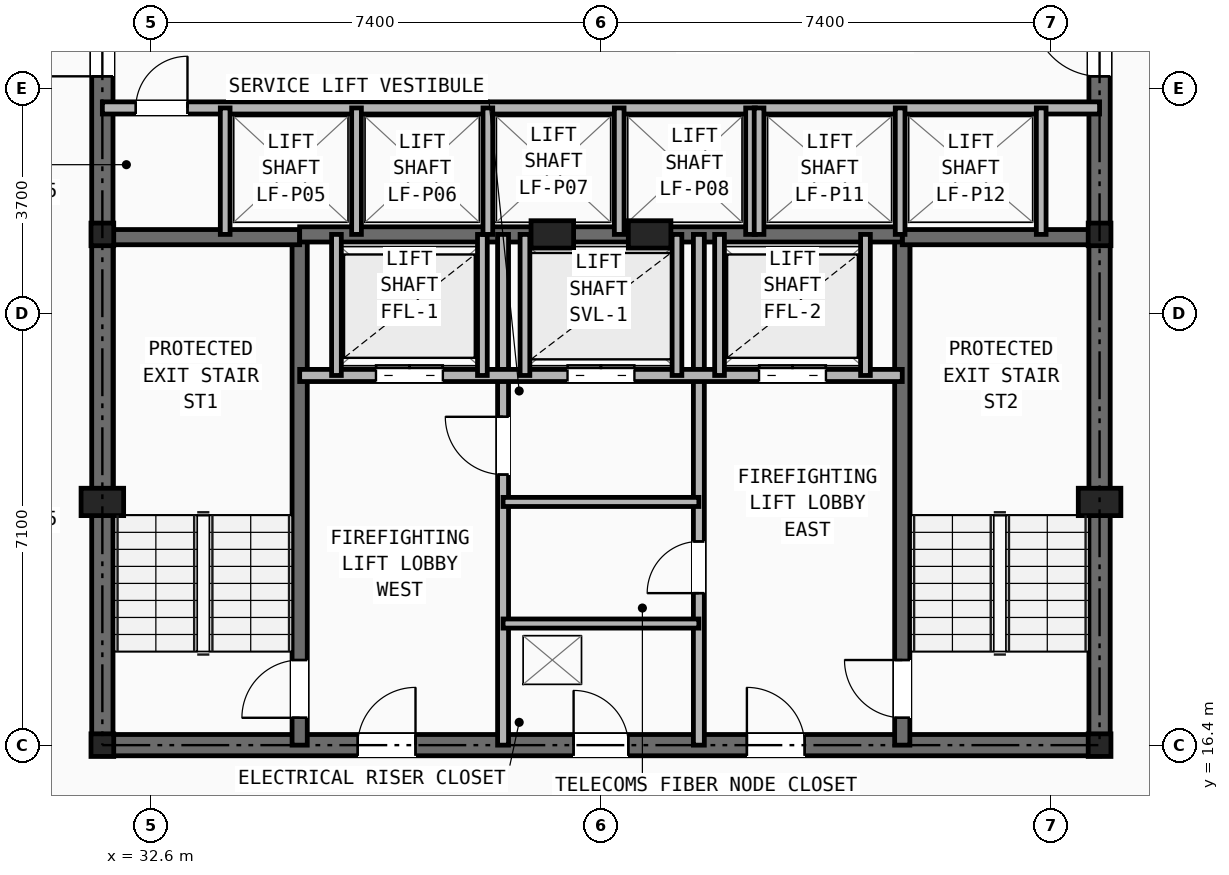
"""IFC4 building model, lengths in metres.
Left out: names, types, materials, properties, quantities, classifications, styles, units other than length and angle.
Written with IfcOpenShell. Run it as: python <this file> out.ifc"""

import sys

from ifc_helpers import new_model, si_unit, direction, frame, frame_2d, origin, origin_2d, place, context, subcontext, project, spatial, rectangle, i_section, extrude, element, fill, save


model = new_model("IFC4")
c1 = context("Model", 3, precision=1e-05, world=origin(), true_north=direction((0.0, 1.0)))
c2 = subcontext(c1, "Body", "Model", "MODEL_VIEW")
j1 = project(units=[si_unit("LENGTHUNIT", "METRE"), si_unit("PLANEANGLEUNIT", "RADIAN")], contexts=[c1])
p1 = place(None, origin())
s1 = spatial("IfcSite", under=j1, at=p1, CompositionType="ELEMENT")
p2 = place(p1, origin())
s2 = spatial("IfcBuilding", under=s1, at=p2, CompositionType="ELEMENT")
p3 = place(p2, frame((0.0, 0.0, 83.0)))
s3 = spatial("IfcBuildingStorey", under=s2, at=p3, CompositionType="ELEMENT", Elevation=83.0)
for number, where, z_axis, x_axis in (
    (1, (31.8, 16.4, 0.0), (0.0, 0.0, 1.0), (1.0, 0.0, 0.0)),
    (2, (48.2, 16.4, 0.0), (0.0, 0.0, 1.0), (1.0, 0.0, 0.0)),
    (3, (31.8, 24.8, 0.0), (0.0, 0.0, 1.0), (1.0, 0.0, 0.0)),
    (4, (48.2, 24.8, 0.0), (0.0, 0.0, 1.0), (1.0, 0.0, 0.0)),
):
    element("IfcColumn", number, at=place(p3, frame(where, z_axis=z_axis, x_axis=x_axis)), inside=s3, PredefinedType="COLUMN", context=c2, shape_type="SweptSolid", body=[
        extrude(i_section(OverallWidth=0.374, OverallDepth=0.372, WebThickness=0.016, FlangeThickness=0.026, at=origin_2d()), origin(), (0.0, 0.0, 1.0), 3.2),
    ])
for number, where, z_axis, x_axis in (
    (5, (31.8, 20.4, 0.0), (0.0, 0.0, 1.0), (1.0, 0.0, 0.0)),
    (6, (48.2, 20.4, 0.0), (0.0, 0.0, 1.0), (1.0, 0.0, 0.0)),
    (7, (39.2, 24.8, 0.0), (0.0, 0.0, 1.0), (1.0, 0.0, 0.0)),
    (8, (40.8, 24.8, 0.0), (0.0, 0.0, 1.0), (1.0, 0.0, 0.0)),
):
    element("IfcColumn", number, at=place(p3, frame(where, z_axis=z_axis, x_axis=x_axis)), inside=s3, PredefinedType="PILASTER", context=c2, shape_type="SweptSolid", body=[
        extrude(rectangle(XDim=0.7, YDim=0.45, at=origin_2d()), origin(), (0.0, 0.0, 1.0), 3.2),
    ])
p4 = place(p3, frame((31.8, 16.4, 0.0), z_axis=(0.0, 0.0, 1.0), x_axis=(1.0, 0.0, 0.0)))
e9 = element("IfcWall", 9, at=p4, inside=s3, PredefinedType="SHEAR", context=c2, shape_type="SweptSolid", body=[
    extrude(rectangle(XDim=16.4, YDim=0.35, at=frame_2d((8.2, 0.0))), origin(), (0.0, 0.0, 1.0), 2.97),
])
p5 = place(p4, frame((7.75, 0.0, 0.0)))
e10 = element("IfcOpeningElement", 10, at=p5, cuts=e9, PredefinedType="OPENING", context=c2, shape_type="SweptSolid", body=[
    extrude(rectangle(XDim=0.9, YDim=2.1, at=frame_2d((0.45, 1.05))), frame((0.0, 0.185, 0.0), z_axis=(0.0, -1.0, 0.0), x_axis=(1.0, 0.0, 0.0)), (0.0, 0.0, 1.0), 0.37),
])
p6 = place(p4, frame((4.2, 0.0, 0.0)))
e11 = element("IfcOpeningElement", 11, at=p6, cuts=e9, PredefinedType="OPENING", context=c2, shape_type="SweptSolid", body=[
    extrude(rectangle(XDim=0.95, YDim=2.1, at=frame_2d((0.475, 1.05))), frame((0.0, 0.185, 0.0), z_axis=(0.0, -1.0, 0.0), x_axis=(1.0, 0.0, 0.0)), (0.0, 0.0, 1.0), 0.37),
])
p7 = place(p4, frame((10.6, 0.0, 0.0)))
e12 = element("IfcOpeningElement", 12, at=p7, cuts=e9, PredefinedType="OPENING", context=c2, shape_type="SweptSolid", body=[
    extrude(rectangle(XDim=0.95, YDim=2.1, at=frame_2d((0.475, 1.05))), frame((0.0, 0.185, 0.0), z_axis=(0.0, -1.0, 0.0), x_axis=(1.0, 0.0, 0.0)), (0.0, 0.0, 1.0), 0.37),
])
p8 = place(p3, frame((31.8, 16.4, 0.0), z_axis=(0.0, 0.0, 1.0), x_axis=(0.0, 1.0, 0.0)))
e13 = element("IfcWall", 13, at=p8, inside=s3, PredefinedType="SHEAR", context=c2, shape_type="SweptSolid", body=[
    extrude(rectangle(XDim=14.8, YDim=0.35, at=frame_2d((7.4, 0.0))), origin(), (0.0, 0.0, 1.0), 2.97),
])
p9 = place(p8, frame((11.0, 0.0, 0.0)))
e14 = element("IfcOpeningElement", 14, at=p9, cuts=e13, PredefinedType="OPENING", context=c2, shape_type="SweptSolid", body=[
    extrude(rectangle(XDim=1.1, YDim=2.15, at=frame_2d((0.55, 1.075))), frame((0.0, 0.185, 0.0), z_axis=(0.0, -1.0, 0.0), x_axis=(1.0, 0.0, 0.0)), (0.0, 0.0, 1.0), 0.37),
])
p10 = place(p3, frame((48.2, 16.4, 0.0), z_axis=(0.0, 0.0, 1.0), x_axis=(0.0, 1.0, 0.0)))
e15 = element("IfcWall", 15, at=p10, inside=s3, PredefinedType="SHEAR", context=c2, shape_type="SweptSolid", body=[
    extrude(rectangle(XDim=14.8, YDim=0.35, at=frame_2d((7.4, 0.0))), origin(), (0.0, 0.0, 1.0), 2.97),
])
p11 = place(p10, frame((11.0, 0.0, 0.0)))
e16 = element("IfcOpeningElement", 16, at=p11, cuts=e15, PredefinedType="OPENING", context=c2, shape_type="SweptSolid", body=[
    extrude(rectangle(XDim=1.1, YDim=2.15, at=frame_2d((0.55, 1.075))), frame((0.0, 0.185, 0.0), z_axis=(0.0, -1.0, 0.0), x_axis=(1.0, 0.0, 0.0)), (0.0, 0.0, 1.0), 0.37),
])
p12 = place(p3, frame((35.045, 16.4, 0.0), z_axis=(0.0, 0.0, 1.0), x_axis=(0.0, 1.0, 0.0)))
e17 = element("IfcWall", 17, at=p12, inside=s3, PredefinedType="SHEAR", context=c2, shape_type="SweptSolid", body=[
    extrude(rectangle(XDim=8.4, YDim=0.25, at=frame_2d((4.2, 0.0))), origin(), (0.0, 0.0, 1.0), 2.97),
])
p13 = place(p12, frame((0.45, 0.0, 0.0)))
e18 = element("IfcOpeningElement", 18, at=p13, cuts=e17, PredefinedType="OPENING", context=c2, shape_type="SweptSolid", body=[
    extrude(rectangle(XDim=0.95, YDim=2.1, at=frame_2d((0.475, 1.05))), frame((0.0, 0.135, 0.0), z_axis=(0.0, -1.0, 0.0), x_axis=(1.0, 0.0, 0.0)), (0.0, 0.0, 1.0), 0.27),
])
p14 = place(p3, frame((31.8, 24.755, 0.0), z_axis=(0.0, 0.0, 1.0), x_axis=(1.0, 0.0, 0.0)))
e19 = element("IfcWall", 19, at=p14, inside=s3, PredefinedType="SHEAR", context=c2, shape_type="SweptSolid", body=[
    extrude(rectangle(XDim=3.245, YDim=0.25, at=frame_2d((1.623, 0.0))), origin(), (0.0, 0.0, 1.0), 2.97),
])
p15 = place(p3, frame((44.955, 16.4, 0.0), z_axis=(0.0, 0.0, 1.0), x_axis=(0.0, 1.0, 0.0)))
e20 = element("IfcWall", 20, at=p15, inside=s3, PredefinedType="SHEAR", context=c2, shape_type="SweptSolid", body=[
    extrude(rectangle(XDim=8.4, YDim=0.25, at=frame_2d((4.2, 0.0))), origin(), (0.0, 0.0, 1.0), 2.97),
])
p16 = place(p15, frame((0.45, 0.0, 0.0)))
e21 = element("IfcOpeningElement", 21, at=p16, cuts=e20, PredefinedType="OPENING", context=c2, shape_type="SweptSolid", body=[
    extrude(rectangle(XDim=0.95, YDim=2.1, at=frame_2d((0.475, 1.05))), frame((0.0, 0.135, 0.0), z_axis=(0.0, -1.0, 0.0), x_axis=(1.0, 0.0, 0.0)), (0.0, 0.0, 1.0), 0.27),
])
p17 = place(p3, frame((44.955, 24.755, 0.0), z_axis=(0.0, 0.0, 1.0), x_axis=(1.0, 0.0, 0.0)))
e22 = element("IfcWall", 22, at=p17, inside=s3, PredefinedType="SHEAR", context=c2, shape_type="SweptSolid", body=[
    extrude(rectangle(XDim=3.245, YDim=0.25, at=frame_2d((1.623, 0.0))), origin(), (0.0, 0.0, 1.0), 2.97),
])
p18 = place(p3, frame((35.045, 24.8, 0.0), z_axis=(0.0, 0.0, 1.0), x_axis=(1.0, 0.0, 0.0)))
e23 = element("IfcWall", 23, at=p18, inside=s3, PredefinedType="SHEAR", context=c2, shape_type="SweptSolid", body=[
    extrude(rectangle(XDim=9.91, YDim=0.25, at=frame_2d((4.955, 0.0))), origin(), (0.0, 0.0, 1.0), 2.97),
])
p19 = place(p3, frame((38.39, 16.4, 0.0), z_axis=(0.0, 0.0, 1.0), x_axis=(0.0, 1.0, 0.0)))
e24 = element("IfcWall", 24, at=p19, inside=s3, PredefinedType="PARTITIONING", context=c2, shape_type="SweptSolid", body=[
    extrude(rectangle(XDim=8.4, YDim=0.18, at=frame_2d((4.2, 0.0))), origin(), (0.0, 0.0, 1.0), 2.421),
])
p20 = place(p19, frame((4.45, 0.0, 0.0)))
e25 = element("IfcOpeningElement", 25, at=p20, cuts=e24, PredefinedType="OPENING", context=c2, shape_type="SweptSolid", body=[
    extrude(rectangle(XDim=0.95, YDim=2.1, at=frame_2d((0.475, 1.05))), frame((0.0, 0.1, 0.0), z_axis=(0.0, -1.0, 0.0), x_axis=(1.0, 0.0, 0.0)), (0.0, 0.0, 1.0), 0.2),
])
p21 = place(p3, frame((41.61, 16.4, 0.0), z_axis=(0.0, 0.0, 1.0), x_axis=(0.0, 1.0, 0.0)))
e26 = element("IfcWall", 26, at=p21, inside=s3, PredefinedType="PARTITIONING", context=c2, shape_type="SweptSolid", body=[
    extrude(rectangle(XDim=8.4, YDim=0.18, at=frame_2d((4.2, 0.0))), origin(), (0.0, 0.0, 1.0), 2.421),
])
p22 = place(p21, frame((2.5, 0.0, 0.0)))
e27 = element("IfcOpeningElement", 27, at=p22, cuts=e26, PredefinedType="OPENING", context=c2, shape_type="SweptSolid", body=[
    extrude(rectangle(XDim=0.85, YDim=2.05, at=frame_2d((0.425, 1.025))), frame((0.0, 0.1, 0.0), z_axis=(0.0, -1.0, 0.0), x_axis=(1.0, 0.0, 0.0)), (0.0, 0.0, 1.0), 0.2),
])
p23 = place(p3, frame((35.045, 22.48, 0.0), z_axis=(0.0, 0.0, 1.0), x_axis=(1.0, 0.0, 0.0)))
e28 = element("IfcWall", 28, at=p23, inside=s3, PredefinedType="SOLIDWALL", context=c2, shape_type="SweptSolid", body=[
    extrude(rectangle(XDim=9.91, YDim=0.2, at=frame_2d((4.955, 0.0))), origin(), (0.0, 0.0, 1.0), 2.97),
])
p24 = place(p23, frame((1.255, 0.0, 0.0)))
e29 = element("IfcOpeningElement", 29, at=p24, cuts=e28, PredefinedType="OPENING", context=c2, shape_type="SweptSolid", body=[
    extrude(rectangle(XDim=1.1, YDim=2.15, at=frame_2d((0.55, 1.075))), frame((0.0, 0.11, 0.0), z_axis=(0.0, -1.0, 0.0), x_axis=(1.0, 0.0, 0.0)), (0.0, 0.0, 1.0), 0.22),
])
p25 = place(p23, frame((7.555, 0.0, 0.0)))
e30 = element("IfcOpeningElement", 30, at=p25, cuts=e28, PredefinedType="OPENING", context=c2, shape_type="SweptSolid", body=[
    extrude(rectangle(XDim=1.1, YDim=2.15, at=frame_2d((0.55, 1.075))), frame((0.0, 0.11, 0.0), z_axis=(0.0, -1.0, 0.0), x_axis=(1.0, 0.0, 0.0)), (0.0, 0.0, 1.0), 0.22),
])
p26 = place(p23, frame((4.405, 0.0, 0.0)))
e31 = element("IfcOpeningElement", 31, at=p26, cuts=e28, PredefinedType="OPENING", context=c2, shape_type="SweptSolid", body=[
    extrude(rectangle(XDim=1.1, YDim=2.15, at=frame_2d((0.55, 1.075))), frame((0.0, 0.11, 0.0), z_axis=(0.0, -1.0, 0.0), x_axis=(1.0, 0.0, 0.0)), (0.0, 0.0, 1.0), 0.22),
])
for number, where, z_axis, x_axis in (
    (32, (38.39, 18.4, 0.0), (0.0, 0.0, 1.0), (1.0, 0.0, 0.0)),
    (33, (38.39, 20.4, 0.0), (0.0, 0.0, 1.0), (1.0, 0.0, 0.0)),
):
    element("IfcWall", number, at=place(p3, frame(where, z_axis=z_axis, x_axis=x_axis)), inside=s3, PredefinedType="PARTITIONING", context=c2, shape_type="SweptSolid", body=[
        extrude(rectangle(XDim=3.22, YDim=0.15, at=frame_2d((1.61, 0.0))), origin(), (0.0, 0.0, 1.0), 2.97),
    ])
for number, where, z_axis, x_axis in (
    (34, (35.65, 22.48, 0.0), (0.0, 0.0, 1.0), (0.0, 1.0, 0.0)),
    (35, (38.05, 22.48, 0.0), (0.0, 0.0, 1.0), (0.0, 1.0, 0.0)),
    (36, (41.95, 22.48, 0.0), (0.0, 0.0, 1.0), (0.0, 1.0, 0.0)),
    (37, (44.35, 22.48, 0.0), (0.0, 0.0, 1.0), (0.0, 1.0, 0.0)),
    (38, (38.75, 22.48, 0.0), (0.0, 0.0, 1.0), (0.0, 1.0, 0.0)),
    (39, (41.25, 22.48, 0.0), (0.0, 0.0, 1.0), (0.0, 1.0, 0.0)),
):
    element("IfcWall", number, at=place(p3, frame(where, z_axis=z_axis, x_axis=x_axis)), inside=s3, PredefinedType="SOLIDWALL", context=c2, shape_type="SweptSolid", body=[
        extrude(rectangle(XDim=2.32, YDim=0.16, at=frame_2d((1.16, 0.0))), origin(), (0.0, 0.0, 1.0), 2.97),
    ])
p27 = place(p3, frame((31.8, 26.88, 0.0), z_axis=(0.0, 0.0, 1.0), x_axis=(1.0, 0.0, 0.0)))
e40 = element("IfcWall", 40, at=p27, inside=s3, PredefinedType="SOLIDWALL", context=c2, shape_type="SweptSolid", body=[
    extrude(rectangle(XDim=16.4, YDim=0.2, at=frame_2d((8.2, 0.0))), origin(), (0.0, 0.0, 1.0), 2.421),
])
p28 = place(p27, frame((0.55, 0.0, 0.0)))
e41 = element("IfcOpeningElement", 41, at=p28, cuts=e40, PredefinedType="OPENING", context=c2, shape_type="SweptSolid", body=[
    extrude(rectangle(XDim=0.85, YDim=2.05, at=frame_2d((0.425, 1.025))), frame((0.0, 0.11, 0.0), z_axis=(0.0, -1.0, 0.0), x_axis=(1.0, 0.0, 0.0)), (0.0, 0.0, 1.0), 0.22),
])
for number, where, z_axis, x_axis in (
    (42, (33.82, 24.8, 0.0), (0.0, 0.0, 1.0), (0.0, 1.0, 0.0)),
    (43, (35.98, 24.8, 0.0), (0.0, 0.0, 1.0), (0.0, 1.0, 0.0)),
    (44, (38.14, 24.8, 0.0), (0.0, 0.0, 1.0), (0.0, 1.0, 0.0)),
    (45, (40.3, 24.8, 0.0), (0.0, 0.0, 1.0), (0.0, 1.0, 0.0)),
    (46, (42.46, 24.8, 0.0), (0.0, 0.0, 1.0), (0.0, 1.0, 0.0)),
    (47, (42.6, 24.8, 0.0), (0.0, 0.0, 1.0), (0.0, 1.0, 0.0)),
    (48, (44.92, 24.8, 0.0), (0.0, 0.0, 1.0), (0.0, 1.0, 0.0)),
    (49, (47.24, 24.8, 0.0), (0.0, 0.0, 1.0), (0.0, 1.0, 0.0)),
):
    element("IfcWall", number, at=place(p3, frame(where, z_axis=z_axis, x_axis=x_axis)), inside=s3, PredefinedType="SOLIDWALL", context=c2, shape_type="SweptSolid", body=[
        extrude(rectangle(XDim=2.08, YDim=0.16, at=frame_2d((1.04, 0.0))), origin(), (0.0, 0.0, 1.0), 2.97),
    ])
p29 = place(p5, origin())
e50 = element("IfcDoor", 50, at=p29, inside=s3, OperationType="SINGLE_SWING_LEFT", PredefinedType="DOOR", context=c2, shape_type="SweptSolid", body=[
    extrude(rectangle(XDim=0.9, YDim=2.1, at=frame_2d((0.45, 1.05))), frame((0.0, 0.025, 0.0), z_axis=(0.0, -1.0, 0.0), x_axis=(1.0, 0.0, 0.0)), (0.0, 0.0, 1.0), 0.05),
])
fill(e10, e50)
p30 = place(p22, origin())
e51 = element("IfcDoor", 51, at=p30, inside=s3, OperationType="SINGLE_SWING_LEFT", PredefinedType="DOOR", context=c2, shape_type="SweptSolid", body=[
    extrude(rectangle(XDim=0.85, YDim=2.05, at=frame_2d((0.425, 1.025))), frame((0.0, 0.025, 0.0), z_axis=(0.0, -1.0, 0.0), x_axis=(1.0, 0.0, 0.0)), (0.0, 0.0, 1.0), 0.05),
])
fill(e27, e51)
p31 = place(p20, origin())
e52 = element("IfcDoor", 52, at=p31, inside=s3, OperationType="SINGLE_SWING_RIGHT", PredefinedType="DOOR", context=c2, shape_type="SweptSolid", body=[
    extrude(rectangle(XDim=0.95, YDim=2.1, at=frame_2d((0.475, 1.05))), frame((0.0, 0.025, 0.0), z_axis=(0.0, -1.0, 0.0), x_axis=(1.0, 0.0, 0.0)), (0.0, 0.0, 1.0), 0.05),
])
fill(e25, e52)
p32 = place(p13, origin())
e53 = element("IfcDoor", 53, at=p32, inside=s3, OperationType="SINGLE_SWING_LEFT", PredefinedType="DOOR", context=c2, shape_type="SweptSolid", body=[
    extrude(rectangle(XDim=0.95, YDim=2.1, at=frame_2d((0.475, 1.05))), frame((0.0, 0.025, 0.0), z_axis=(0.0, -1.0, 0.0), x_axis=(1.0, 0.0, 0.0)), (0.0, 0.0, 1.0), 0.05),
])
fill(e18, e53)
p33 = place(p16, origin())
e54 = element("IfcDoor", 54, at=p33, inside=s3, OperationType="SINGLE_SWING_RIGHT", PredefinedType="DOOR", context=c2, shape_type="SweptSolid", body=[
    extrude(rectangle(XDim=0.95, YDim=2.1, at=frame_2d((0.475, 1.05))), frame((0.0, 0.025, 0.0), z_axis=(0.0, -1.0, 0.0), x_axis=(1.0, 0.0, 0.0)), (0.0, 0.0, 1.0), 0.05),
])
fill(e21, e54)
p34 = place(p6, origin())
e55 = element("IfcDoor", 55, at=p34, inside=s3, OperationType="SINGLE_SWING_RIGHT", PredefinedType="DOOR", context=c2, shape_type="SweptSolid", body=[
    extrude(rectangle(XDim=0.95, YDim=2.1, at=frame_2d((0.475, 1.05))), frame((0.0, 0.025, 0.0), z_axis=(0.0, -1.0, 0.0), x_axis=(1.0, 0.0, 0.0)), (0.0, 0.0, 1.0), 0.05),
])
fill(e11, e55)
p35 = place(p7, origin())
e56 = element("IfcDoor", 56, at=p35, inside=s3, OperationType="SINGLE_SWING_LEFT", PredefinedType="DOOR", context=c2, shape_type="SweptSolid", body=[
    extrude(rectangle(XDim=0.95, YDim=2.1, at=frame_2d((0.475, 1.05))), frame((0.0, 0.025, 0.0), z_axis=(0.0, -1.0, 0.0), x_axis=(1.0, 0.0, 0.0)), (0.0, 0.0, 1.0), 0.05),
])
fill(e12, e56)
p36 = place(p24, origin())
e57 = element("IfcDoor", 57, at=p36, inside=s3, OperationType="DOUBLE_DOOR_SLIDING", PredefinedType="DOOR", context=c2, shape_type="SweptSolid", body=[
    extrude(rectangle(XDim=1.1, YDim=2.15, at=frame_2d((0.55, 1.075))), frame((0.0, 0.025, 0.0), z_axis=(0.0, -1.0, 0.0), x_axis=(1.0, 0.0, 0.0)), (0.0, 0.0, 1.0), 0.05),
])
fill(e29, e57)
p37 = place(p25, origin())
e58 = element("IfcDoor", 58, at=p37, inside=s3, OperationType="DOUBLE_DOOR_SLIDING", PredefinedType="DOOR", context=c2, shape_type="SweptSolid", body=[
    extrude(rectangle(XDim=1.1, YDim=2.15, at=frame_2d((0.55, 1.075))), frame((0.0, 0.025, 0.0), z_axis=(0.0, -1.0, 0.0), x_axis=(1.0, 0.0, 0.0)), (0.0, 0.0, 1.0), 0.05),
])
fill(e30, e58)
p38 = place(p26, origin())
e59 = element("IfcDoor", 59, at=p38, inside=s3, OperationType="DOUBLE_DOOR_SLIDING", PredefinedType="DOOR", context=c2, shape_type="SweptSolid", body=[
    extrude(rectangle(XDim=1.1, YDim=2.15, at=frame_2d((0.55, 1.075))), frame((0.0, 0.025, 0.0), z_axis=(0.0, -1.0, 0.0), x_axis=(1.0, 0.0, 0.0)), (0.0, 0.0, 1.0), 0.05),
])
fill(e31, e59)
p39 = place(p28, origin())
e60 = element("IfcDoor", 60, at=p39, inside=s3, OperationType="SINGLE_SWING_RIGHT", PredefinedType="DOOR", context=c2, shape_type="SweptSolid", body=[
    extrude(rectangle(XDim=0.85, YDim=2.05, at=frame_2d((0.425, 1.025))), frame((0.0, 0.025, 0.0), z_axis=(0.0, -1.0, 0.0), x_axis=(1.0, 0.0, 0.0)), (0.0, 0.0, 1.0), 0.05),
])
fill(e41, e60)
p40 = place(p9, origin())
e61 = element("IfcDoor", 61, at=p40, inside=s3, OperationType="SINGLE_SWING_LEFT", PredefinedType="DOOR", context=c2, shape_type="SweptSolid", body=[
    extrude(rectangle(XDim=1.1, YDim=2.15, at=frame_2d((0.55, 1.075))), frame((0.0, 0.025, 0.0), z_axis=(0.0, -1.0, 0.0), x_axis=(1.0, 0.0, 0.0)), (0.0, 0.0, 1.0), 0.05),
])
fill(e14, e61)
p41 = place(p11, origin())
e62 = element("IfcDoor", 62, at=p41, inside=s3, OperationType="SINGLE_SWING_RIGHT", PredefinedType="DOOR", context=c2, shape_type="SweptSolid", body=[
    extrude(rectangle(XDim=1.1, YDim=2.15, at=frame_2d((0.55, 1.075))), frame((0.0, 0.025, 0.0), z_axis=(0.0, -1.0, 0.0), x_axis=(1.0, 0.0, 0.0)), (0.0, 0.0, 1.0), 0.05),
])
fill(e16, e62)
save(model, sys.argv[1])
